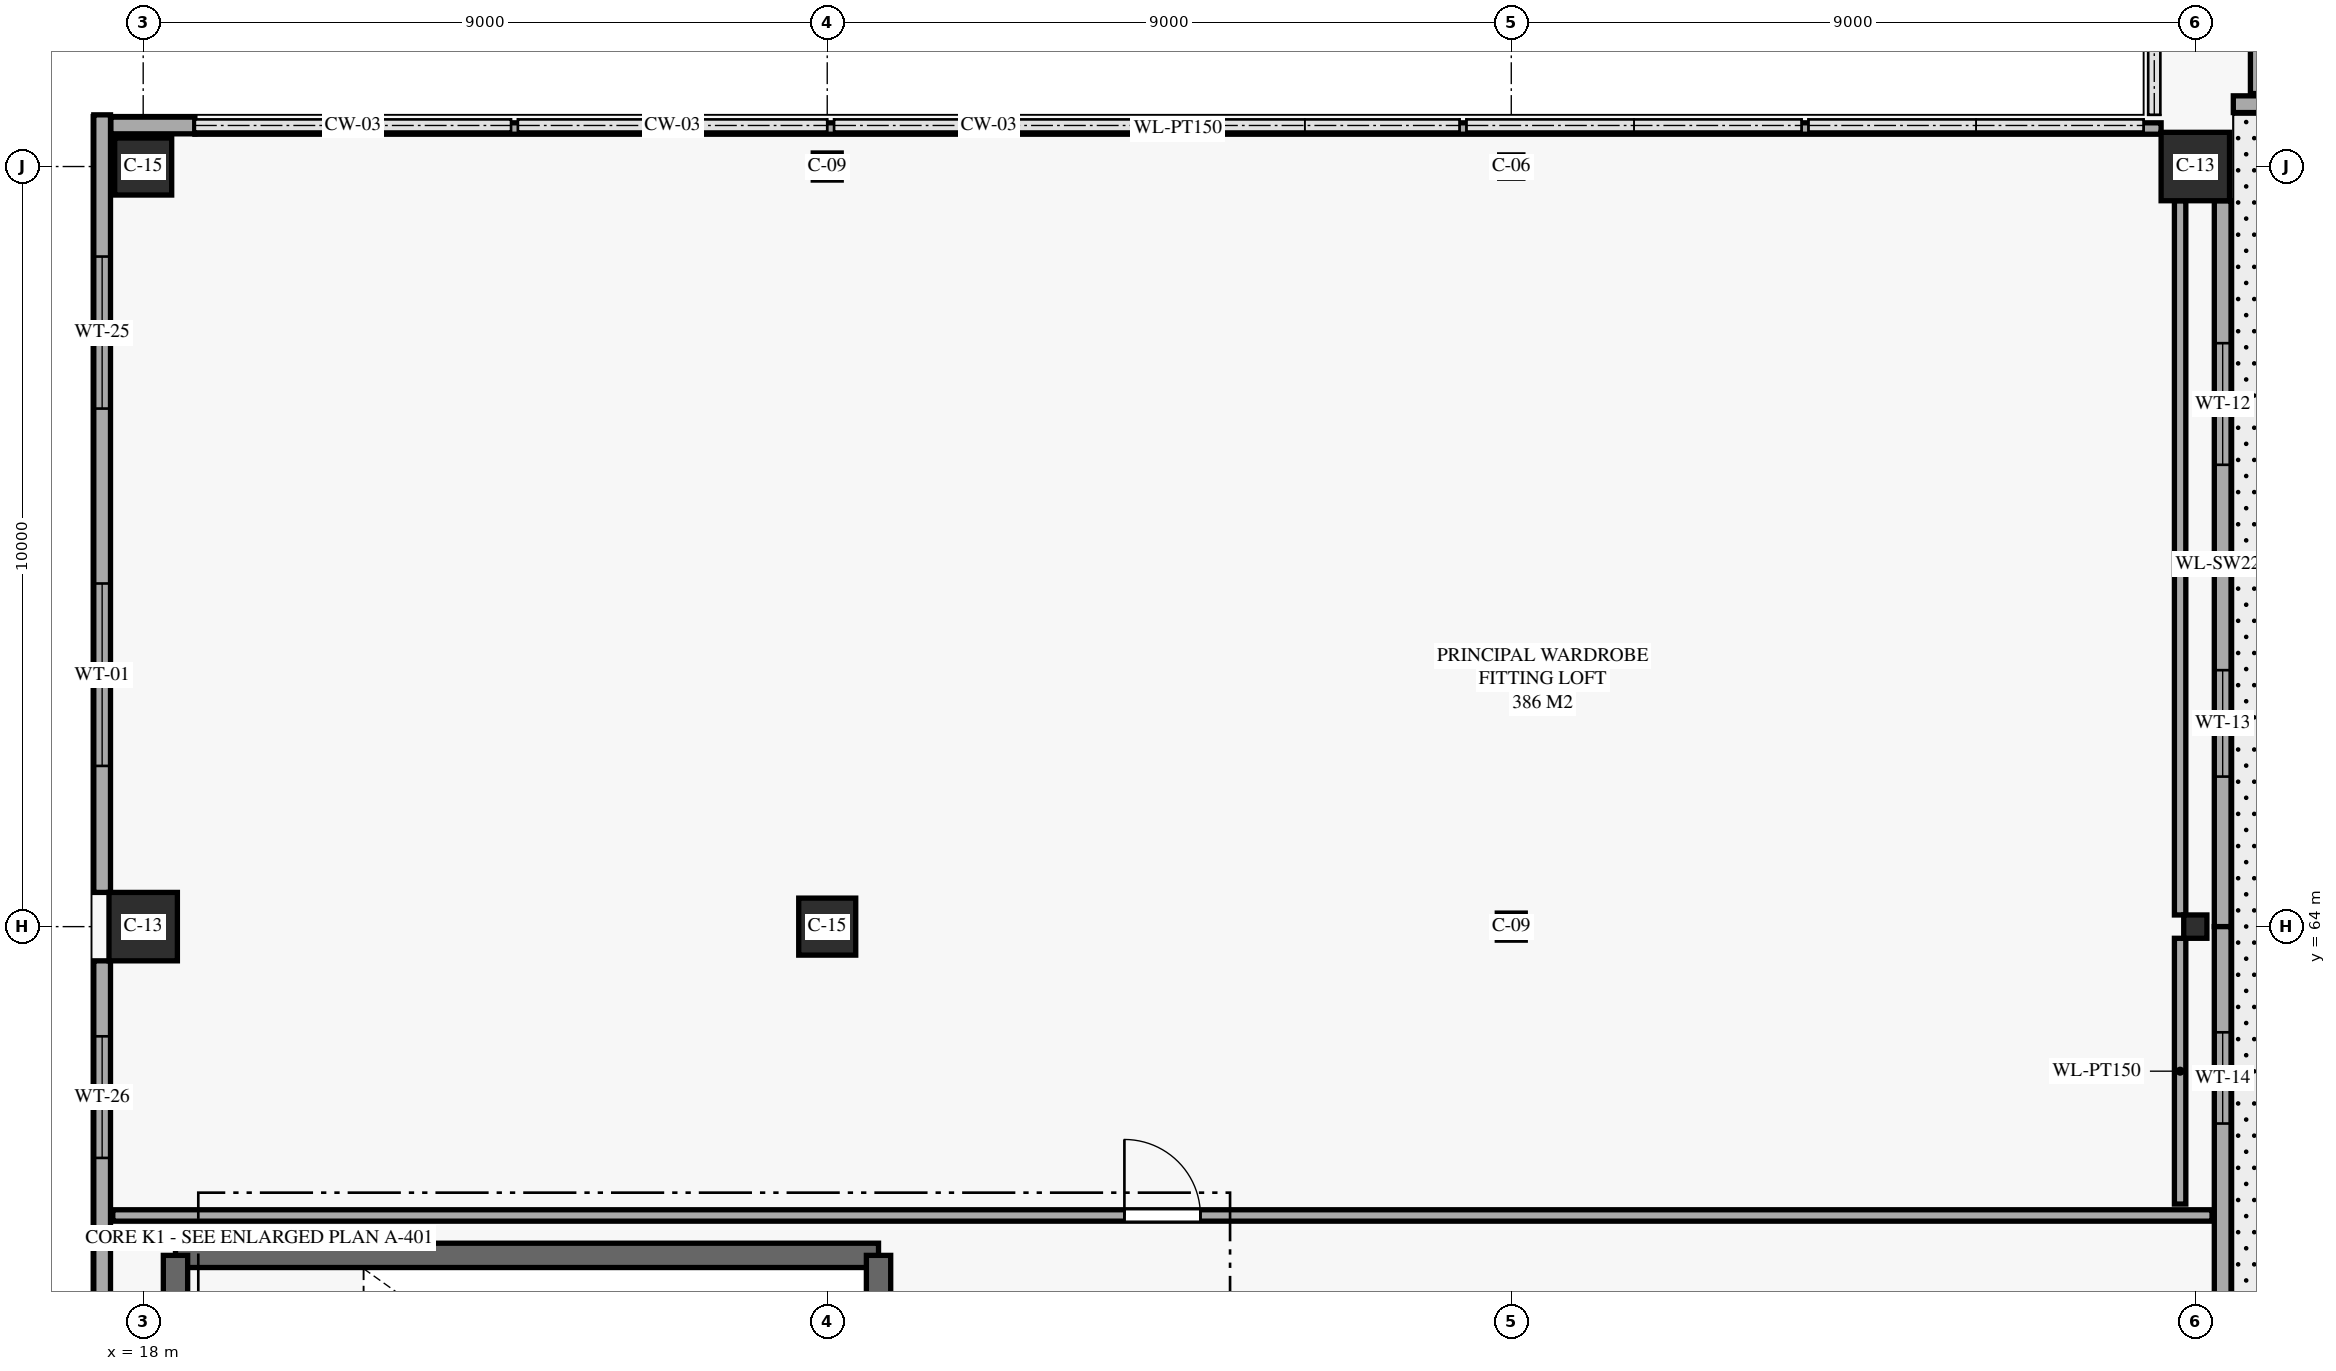
"""IFC4 building model, lengths in metres.
Left out: names, types, materials, properties, quantities, classifications, styles, units other than length and angle.
Written with IfcOpenShell. Run it as: python <this file> out.ifc"""

import sys

from ifc_helpers import new_model, si_unit, direction, frame, frame_2d, origin, origin_2d, place, context, subcontext, project, spatial, rectangle, i_section, extrude, element, fill, save


model = new_model("IFC4")
c1 = context("Model", 3, precision=1e-05, world=origin(), true_north=direction((0.0, 1.0)))
c2 = subcontext(c1, "Body", "Model", "MODEL_VIEW")
j1 = project(units=[si_unit("LENGTHUNIT", "METRE"), si_unit("PLANEANGLEUNIT", "RADIAN")], contexts=[c1])
p1 = place(None, origin())
s1 = spatial("IfcSite", under=j1, at=p1, CompositionType="ELEMENT")
p2 = place(p1, origin())
s2 = spatial("IfcBuilding", under=s1, at=p2, CompositionType="ELEMENT")
p3 = place(p2, frame((0.0, 0.0, 24.8)))
s3 = spatial("IfcBuildingStorey", under=s2, at=p3, CompositionType="ELEMENT", Elevation=24.8)
p4 = place(p3, frame((18.0, 64.0, 0.0), z_axis=(0.0, 0.0, 1.0), x_axis=(1.0, 0.0, 0.0)))
e1 = element("IfcColumn", 1, at=p4, inside=s3, PredefinedType="COLUMN", context=c2, shape_type="SweptSolid", body=[
    extrude(rectangle(XDim=0.9, YDim=0.9, at=origin_2d()), origin(), (0.0, 0.0, 1.0), 4.53),
])
for number, where, z_axis, x_axis in (
    (2, (18.0, 74.0, 0.0), (0.0, 0.0, 1.0), (1.0, 0.0, 0.0)),
    (3, (27.0, 64.0, 0.0), (0.0, 0.0, 1.0), (1.0, 0.0, 0.0)),
):
    element("IfcColumn", number, at=place(p3, frame(where, z_axis=z_axis, x_axis=x_axis)), inside=s3, PredefinedType="COLUMN", context=c2, shape_type="SweptSolid", body=[
        extrude(rectangle(XDim=0.75, YDim=0.75, at=origin_2d()), origin(), (0.0, 0.0, 1.0), 4.53),
    ])
for number, where, z_axis, x_axis in (
    (4, (27.0, 74.0, 0.0), (0.0, 0.0, 1.0), (1.0, 0.0, 0.0)),
    (5, (36.0, 64.0, 0.0), (0.0, 0.0, 1.0), (1.0, 0.0, 0.0)),
):
    element("IfcColumn", number, at=place(p3, frame(where, z_axis=z_axis, x_axis=x_axis)), inside=s3, PredefinedType="COLUMN", context=c2, shape_type="SweptSolid", body=[
        extrude(i_section(OverallWidth=0.368, OverallDepth=0.356, WebThickness=0.011, FlangeThickness=0.018, FilletRadius=0.015, at=origin_2d()), origin(), (0.0, 0.0, 1.0), 4.53),
    ])
for number, where, z_axis, x_axis in (
    (6, (36.0, 74.0, 0.0), (0.0, 0.0, 1.0), (1.0, 0.0, 0.0)),
    (7, (45.0, 64.0, 0.0), (0.0, 0.0, 1.0), (1.0, 0.0, 0.0)),
):
    element("IfcColumn", number, at=place(p3, frame(where, z_axis=z_axis, x_axis=x_axis)), inside=s3, PredefinedType="COLUMN", context=c2, shape_type="SweptSolid", body=[
        extrude(i_section(OverallWidth=0.305, OverallDepth=0.307, WebThickness=0.01, FlangeThickness=0.015, FilletRadius=0.013, at=origin_2d()), origin(), (0.0, 0.0, 1.0), 4.53),
    ])
p5 = place(p3, frame((45.0, 74.0, 0.0), z_axis=(0.0, 0.0, 1.0), x_axis=(1.0, 0.0, 0.0)))
e8 = element("IfcColumn", 8, at=p5, inside=s3, PredefinedType="COLUMN", context=c2, shape_type="SweptSolid", body=[
    extrude(rectangle(XDim=0.9, YDim=0.9, at=origin_2d()), origin(), (0.0, 0.0, 1.0), 4.53),
])
p6 = place(p3, frame((27.675, 59.675, 0.0), z_axis=(0.0, 0.0, 1.0), x_axis=(-1.0, 0.0, 0.0)))
e9 = element("IfcWall", 9, at=p6, inside=s3, PredefinedType="SHEAR", context=c2, shape_type="SweptSolid", body=[
    extrude(rectangle(XDim=9.25, YDim=0.32, at=frame_2d((4.625, 0.0))), origin(), (0.0, 0.0, 1.0), 4.53),
])
for number, where, z_axis, x_axis in (
    (10, (18.425, 59.675, 0.0), (0.0, 0.0, 1.0), (0.0, -1.0, 0.0)),
    (11, (27.675, 54.625, 0.0), (0.0, 0.0, 1.0), (0.0, 1.0, 0.0)),
):
    element("IfcWall", number, at=place(p3, frame(where, z_axis=z_axis, x_axis=x_axis)), inside=s3, PredefinedType="SHEAR", context=c2, shape_type="SweptSolid", body=[
        extrude(rectangle(XDim=5.05, YDim=0.32, at=frame_2d((2.525, 0.0))), origin(), (0.0, 0.0, 1.0), 4.53),
    ])
p7 = place(p3, frame((54.0, 74.82, 0.0), z_axis=(0.0, 0.0, 1.0), x_axis=(-1.0, 0.0, 0.0)))
e12 = element("IfcWall", 12, at=p7, inside=s3, PredefinedType="SOLIDWALL", context=c2, shape_type="SweptSolid", body=[
    extrude(rectangle(XDim=8.5, YDim=0.22, at=frame_2d((4.25, 0.0))), origin(), (0.0, 0.0, 1.0), 4.53),
])
p8 = place(p3, frame((45.36, 73.55, 0.0), z_axis=(0.0, 0.0, 1.0), x_axis=(0.0, -1.0, 0.0)))
e13 = element("IfcWall", 13, at=p8, inside=s3, PredefinedType="SOLIDWALL", context=c2, shape_type="SweptSolid", body=[
    extrude(rectangle(XDim=9.55, YDim=0.22, at=frame_2d((4.775, 0.0))), origin(), (0.0, 0.0, 1.0), 3.82),
])
p9 = place(p8, frame((1.874, 0.0, 0.65)))
e14 = element("IfcOpeningElement", 14, at=p9, cuts=e13, PredefinedType="OPENING", context=c2, shape_type="SweptSolid", body=[
    extrude(rectangle(XDim=1.6, YDim=2.05, at=frame_2d((0.8, 1.025))), frame((0.0, 0.12, 0.0), z_axis=(0.0, -1.0, 0.0), x_axis=(1.0, 0.0, 0.0)), (0.0, 0.0, 1.0), 0.24),
])
p10 = place(p8, frame((6.176, 0.0, 0.65)))
e15 = element("IfcOpeningElement", 15, at=p10, cuts=e13, PredefinedType="OPENING", context=c2, shape_type="SweptSolid", body=[
    extrude(rectangle(XDim=1.4, YDim=2.05, at=frame_2d((0.7, 1.025))), frame((0.0, 0.12, 0.0), z_axis=(0.0, -1.0, 0.0), x_axis=(1.0, 0.0, 0.0)), (0.0, 0.0, 1.0), 0.24),
])
p11 = place(p3, frame((45.36, 64.0, 0.0), z_axis=(0.0, 0.0, 1.0), x_axis=(0.0, -1.0, 0.0)))
e16 = element("IfcWall", 16, at=p11, inside=s3, PredefinedType="SOLIDWALL", context=c2, shape_type="SweptSolid", body=[
    extrude(rectangle(XDim=10.68, YDim=0.22, at=frame_2d((5.34, 0.0))), origin(), (0.0, 0.0, 1.0), 4.53),
])
p12 = place(p11, frame((1.39, 0.0, 0.65)))
e17 = element("IfcOpeningElement", 17, at=p12, cuts=e16, PredefinedType="OPENING", context=c2, shape_type="SweptSolid", body=[
    extrude(rectangle(XDim=1.2, YDim=2.05, at=frame_2d((0.6, 1.025))), frame((0.0, 0.12, 0.0), z_axis=(0.0, -1.0, 0.0), x_axis=(1.0, 0.0, 0.0)), (0.0, 0.0, 1.0), 0.24),
])
p13 = place(p11, frame((6.74, 0.0, 0.8)))
e18 = element("IfcOpeningElement", 18, at=p13, cuts=e16, PredefinedType="OPENING", context=c2, shape_type="SweptSolid", body=[
    extrude(rectangle(XDim=1.9, YDim=1.8, at=frame_2d((0.95, 0.9))), frame((0.0, 0.12, 0.0), z_axis=(0.0, -1.0, 0.0), x_axis=(1.0, 0.0, 0.0)), (0.0, 0.0, 1.0), 0.24),
])
p14 = place(p3, frame((17.46, 53.575, 0.0), z_axis=(0.0, 0.0, 1.0), x_axis=(0.0, 1.0, 0.0)))
e19 = element("IfcWall", 19, at=p14, inside=s3, PredefinedType="SOLIDWALL", context=c2, shape_type="SweptSolid", body=[
    extrude(rectangle(XDim=9.975, YDim=0.22, at=frame_2d((4.988, 0.0))), origin(), (0.0, 0.0, 1.0), 4.53),
])
p15 = place(p14, frame((2.243, 0.0, 0.8)))
e20 = element("IfcOpeningElement", 20, at=p15, cuts=e19, PredefinedType="OPENING", context=c2, shape_type="SweptSolid", body=[
    extrude(rectangle(XDim=1.1, YDim=1.8, at=frame_2d((0.55, 0.9))), frame((0.0, 0.12, 0.0), z_axis=(0.0, -1.0, 0.0), x_axis=(1.0, 0.0, 0.0)), (0.0, 0.0, 1.0), 0.24),
])
p16 = place(p14, frame((7.382, 0.0, 0.8)))
e21 = element("IfcOpeningElement", 21, at=p16, cuts=e19, PredefinedType="OPENING", context=c2, shape_type="SweptSolid", body=[
    extrude(rectangle(XDim=1.6, YDim=1.5, at=frame_2d((0.8, 0.75))), frame((0.0, 0.12, 0.0), z_axis=(0.0, -1.0, 0.0), x_axis=(1.0, 0.0, 0.0)), (0.0, 0.0, 1.0), 0.24),
])
p17 = place(p3, frame((17.46, 64.45, 0.0), z_axis=(0.0, 0.0, 1.0), x_axis=(0.0, 1.0, 0.0)))
e22 = element("IfcWall", 22, at=p17, inside=s3, PredefinedType="SOLIDWALL", context=c2, shape_type="SweptSolid", body=[
    extrude(rectangle(XDim=10.23, YDim=0.22, at=frame_2d((5.115, 0.0))), origin(), (0.0, 0.0, 1.0), 4.53),
])
p18 = place(p17, frame((1.664, 0.0, 0.65)))
e23 = element("IfcOpeningElement", 23, at=p18, cuts=e22, PredefinedType="OPENING", context=c2, shape_type="SweptSolid", body=[
    extrude(rectangle(XDim=2.4, YDim=2.3, at=frame_2d((1.2, 1.15))), frame((0.0, 0.12, 0.0), z_axis=(0.0, -1.0, 0.0), x_axis=(1.0, 0.0, 0.0)), (0.0, 0.0, 1.0), 0.24),
])
p19 = place(p17, frame((6.365, 0.0, 0.8)))
e24 = element("IfcOpeningElement", 24, at=p19, cuts=e22, PredefinedType="OPENING", context=c2, shape_type="SweptSolid", body=[
    extrude(rectangle(XDim=2.0, YDim=1.5, at=frame_2d((1.0, 0.75))), frame((0.0, 0.12, 0.0), z_axis=(0.0, -1.0, 0.0), x_axis=(1.0, 0.0, 0.0)), (0.0, 0.0, 1.0), 0.24),
])
p20 = place(p3, frame((17.575, 74.54, 0.0), z_axis=(0.0, 0.0, 1.0), x_axis=(1.0, 0.0, 0.0)))
e25 = element("IfcWall", 25, at=p20, inside=s3, PredefinedType="SOLIDWALL", context=c2, shape_type="SweptSolid", body=[
    extrude(rectangle(XDim=1.105, YDim=0.22, at=frame_2d((0.552, 0.0))), origin(), (0.0, 0.0, 1.0), 4.53),
])
p21 = place(p3, frame((45.8, 89.65, 0.0), z_axis=(0.0, 0.0, 1.0), x_axis=(0.0, -1.0, 0.0)))
e26 = element("IfcWall", 26, at=p21, inside=s3, PredefinedType="PARTITIONING", context=c2, shape_type="SweptSolid", body=[
    extrude(rectangle(XDim=14.69, YDim=0.15, at=frame_2d((7.345, 0.0))), origin(), (0.0, 0.0, 1.0), 4.53),
])
p22 = place(p3, frame((17.6, 60.2, 0.0), z_axis=(0.0, 0.0, 1.0), x_axis=(1.0, 0.0, 0.0)))
e27 = element("IfcWall", 27, at=p22, inside=s3, PredefinedType="PARTITIONING", context=c2, shape_type="SweptSolid", body=[
    extrude(rectangle(XDim=27.62, YDim=0.15, at=frame_2d((13.81, 0.0))), origin(), (0.0, 0.0, 1.0), 4.53),
])
p23 = place(p22, frame((13.31, 0.0, 0.0)))
e28 = element("IfcOpeningElement", 28, at=p23, cuts=e27, PredefinedType="OPENING", context=c2, shape_type="SweptSolid", body=[
    extrude(rectangle(XDim=1.0, YDim=2.15, at=frame_2d((0.5, 1.075))), frame((0.0, 0.085, 0.0), z_axis=(0.0, -1.0, 0.0), x_axis=(1.0, 0.0, 0.0)), (0.0, 0.0, 1.0), 0.17),
])
p24 = place(p3, frame((44.55, 74.5, 0.0), z_axis=(0.0, 0.0, 1.0), x_axis=(-1.0, 0.0, 0.0)))
e29 = element("IfcWall", 29, at=p24, inside=s3, PredefinedType="PARTITIONING", context=c2, shape_type="SweptSolid", body=[
    extrude(rectangle(XDim=25.87, YDim=0.15, at=frame_2d((12.935, 0.0))), origin(), (0.0, 0.0, 1.0), 4.53),
])
p25 = place(p3, frame((44.8, 60.35, 0.0), z_axis=(0.0, 0.0, 1.0), x_axis=(0.0, 1.0, 0.0)))
e30 = element("IfcWall", 30, at=p25, inside=s3, PredefinedType="PARTITIONING", context=c2, shape_type="SweptSolid", body=[
    extrude(rectangle(XDim=3.496, YDim=0.15, at=frame_2d((1.748, 0.0))), origin(), (0.0, 0.0, 1.0), 4.053),
])
p26 = place(p3, frame((44.8, 64.154, 0.0), z_axis=(0.0, 0.0, 1.0), x_axis=(0.0, 1.0, 0.0)))
e31 = element("IfcWall", 31, at=p26, inside=s3, PredefinedType="PARTITIONING", context=c2, shape_type="SweptSolid", body=[
    extrude(rectangle(XDim=9.396, YDim=0.15, at=frame_2d((4.698, 0.0))), origin(), (0.0, 0.0, 1.0), 3.82),
])
p27 = place(p9, origin())
e32 = element("IfcWindow", 32, at=p27, inside=s3, PartitioningType="SINGLE_PANEL", PredefinedType="WINDOW", context=c2, shape_type="SweptSolid", body=[
    extrude(rectangle(XDim=1.6, YDim=2.05, at=frame_2d((0.8, 1.025))), frame((0.0, 0.03, 0.0), z_axis=(0.0, -1.0, 0.0), x_axis=(1.0, 0.0, 0.0)), (0.0, 0.0, 1.0), 0.06),
])
fill(e14, e32)
p28 = place(p10, origin())
e33 = element("IfcWindow", 33, at=p28, inside=s3, PartitioningType="SINGLE_PANEL", PredefinedType="WINDOW", context=c2, shape_type="SweptSolid", body=[
    extrude(rectangle(XDim=1.4, YDim=2.05, at=frame_2d((0.7, 1.025))), frame((0.0, 0.03, 0.0), z_axis=(0.0, -1.0, 0.0), x_axis=(1.0, 0.0, 0.0)), (0.0, 0.0, 1.0), 0.06),
])
fill(e15, e33)
p29 = place(p12, origin())
e34 = element("IfcWindow", 34, at=p29, inside=s3, PartitioningType="SINGLE_PANEL", PredefinedType="WINDOW", context=c2, shape_type="SweptSolid", body=[
    extrude(rectangle(XDim=1.2, YDim=2.05, at=frame_2d((0.6, 1.025))), frame((0.0, 0.03, 0.0), z_axis=(0.0, -1.0, 0.0), x_axis=(1.0, 0.0, 0.0)), (0.0, 0.0, 1.0), 0.06),
])
fill(e17, e34)
p30 = place(p16, origin())
e35 = element("IfcWindow", 35, at=p30, inside=s3, PartitioningType="SINGLE_PANEL", PredefinedType="WINDOW", context=c2, shape_type="SweptSolid", body=[
    extrude(rectangle(XDim=1.6, YDim=1.5, at=frame_2d((0.8, 0.75))), frame((0.0, 0.03, 0.0), z_axis=(0.0, -1.0, 0.0), x_axis=(1.0, 0.0, 0.0)), (0.0, 0.0, 1.0), 0.06),
])
fill(e21, e35)
p31 = place(p18, origin())
e36 = element("IfcWindow", 36, at=p31, inside=s3, PartitioningType="SINGLE_PANEL", PredefinedType="WINDOW", context=c2, shape_type="SweptSolid", body=[
    extrude(rectangle(XDim=2.4, YDim=2.3, at=frame_2d((1.2, 1.15))), frame((0.0, 0.03, 0.0), z_axis=(0.0, -1.0, 0.0), x_axis=(1.0, 0.0, 0.0)), (0.0, 0.0, 1.0), 0.06),
])
fill(e23, e36)
p32 = place(p19, origin())
e37 = element("IfcWindow", 37, at=p32, inside=s3, PartitioningType="SINGLE_PANEL", PredefinedType="WINDOW", context=c2, shape_type="SweptSolid", body=[
    extrude(rectangle(XDim=2.0, YDim=1.5, at=frame_2d((1.0, 0.75))), frame((0.0, 0.03, 0.0), z_axis=(0.0, -1.0, 0.0), x_axis=(1.0, 0.0, 0.0)), (0.0, 0.0, 1.0), 0.06),
])
fill(e24, e37)
p33 = place(p23, origin())
e38 = element("IfcDoor", 38, at=p33, inside=s3, OperationType="SINGLE_SWING_LEFT", PredefinedType="DOOR", context=c2, shape_type="SweptSolid", body=[
    extrude(rectangle(XDim=1.0, YDim=2.15, at=frame_2d((0.5, 1.075))), frame((0.0, 0.025, 0.0), z_axis=(0.0, -1.0, 0.0), x_axis=(1.0, 0.0, 0.0)), (0.0, 0.0, 1.0), 0.05),
])
fill(e28, e38)
save(model, sys.argv[1])
